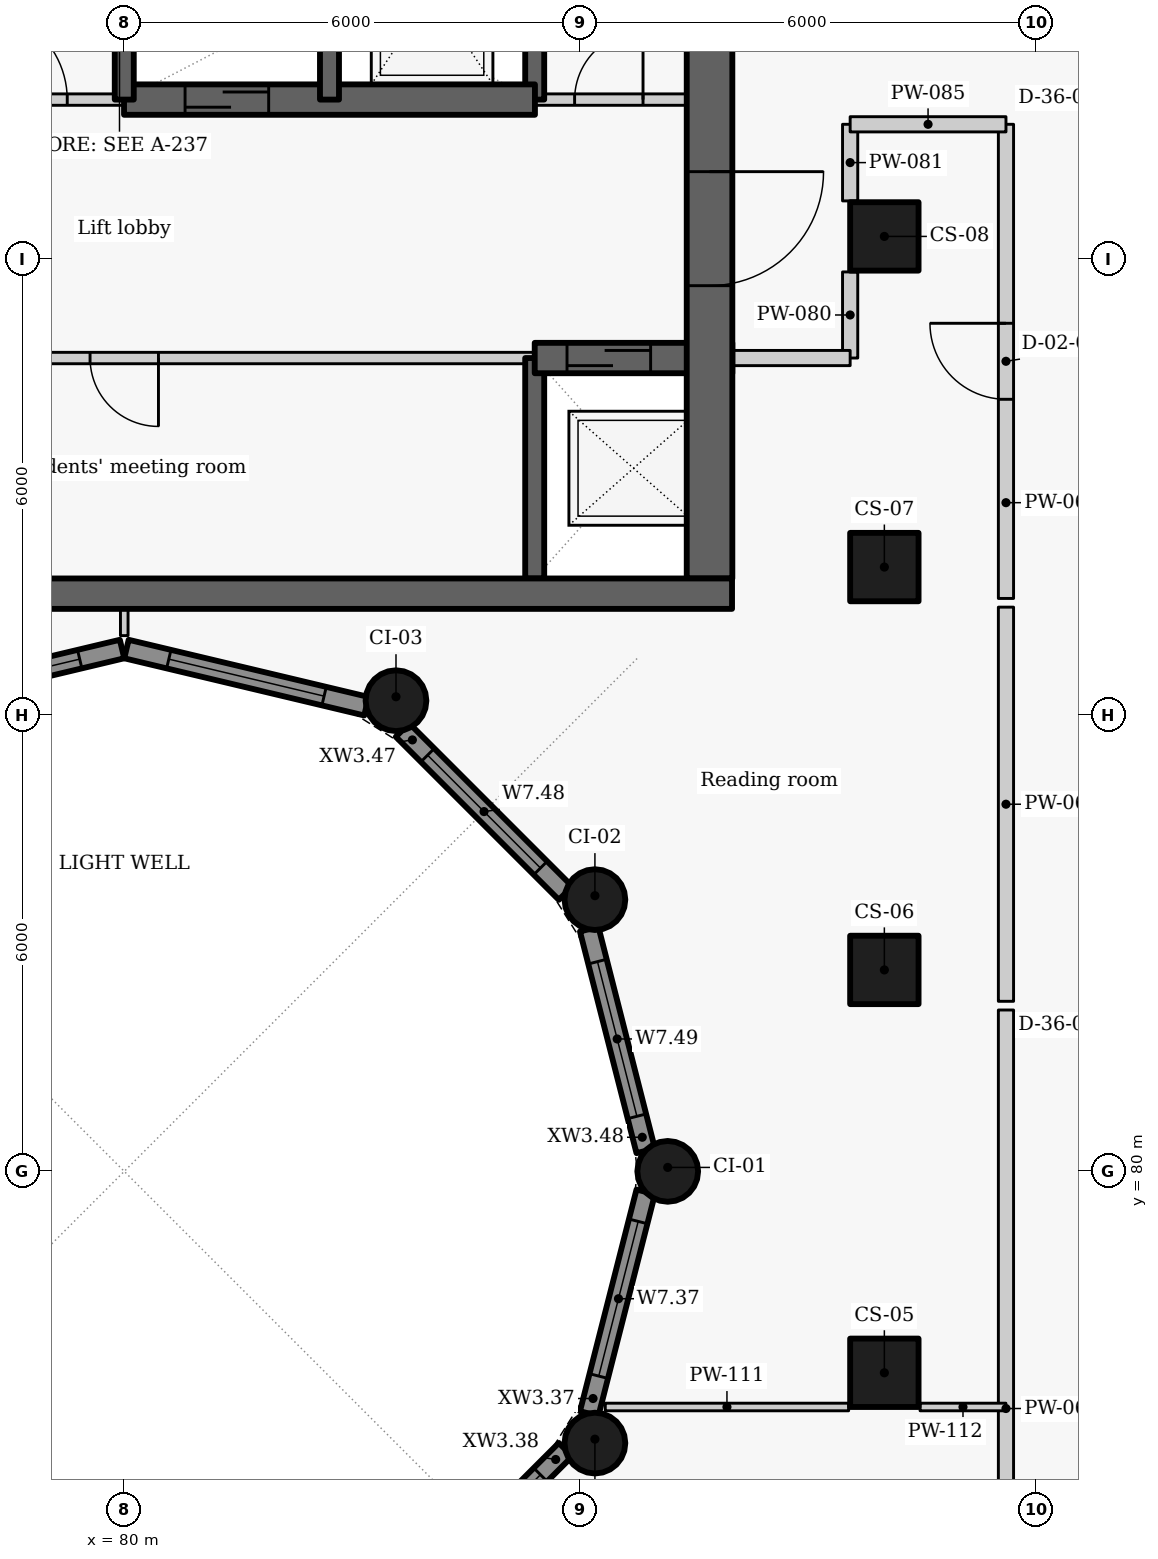
"""IFC4 building model, lengths in metres.
Left out: names, types, materials, properties, quantities, classifications, styles, units other than length and angle.
Written with IfcOpenShell. Run it as: python <this file> out.ifc"""

import sys

from ifc_helpers import new_model, si_unit, direction, frame, frame_2d, origin, origin_2d, place, context, subcontext, project, spatial, rectangle, circle, extrude, element, fill, save


model = new_model("IFC4")
c1 = context("Model", 3, precision=1e-05, world=origin(), true_north=direction((0.0, 1.0)))
c2 = subcontext(c1, "Body", "Model", "MODEL_VIEW")
j1 = project(units=[si_unit("LENGTHUNIT", "METRE"), si_unit("PLANEANGLEUNIT", "RADIAN")], contexts=[c1])
p1 = place(None, origin())
s1 = spatial("IfcSite", under=j1, at=p1, CompositionType="ELEMENT")
p2 = place(p1, origin())
s2 = spatial("IfcBuilding", under=s1, at=p2, CompositionType="ELEMENT")
p3 = place(p2, frame((0.0, 0.0, 216.3)))
s3 = spatial("IfcBuildingStorey", under=s2, at=p3, CompositionType="ELEMENT", Elevation=216.3)
for number, where, z_axis, x_axis in (
    (1, (90.0, 77.35, 0.0), (0.0, 0.0, 1.0), (0.0, 1.0, 0.0)),
    (2, (90.0, 82.65, 0.0), (0.0, 0.0, 1.0), (0.0, 1.0, 0.0)),
    (3, (90.0, 87.95, 0.0), (0.0, 0.0, 1.0), (0.0, 1.0, 0.0)),
    (4, (90.0, 92.3, 0.0), (0.0, 0.0, 1.0), (0.0, 1.0, 0.0)),
):
    element("IfcColumn", number, at=place(p3, frame(where, z_axis=z_axis, x_axis=x_axis)), inside=s3, PredefinedType="COLUMN", context=c2, shape_type="SweptSolid", body=[
        extrude(rectangle(XDim=0.9, YDim=0.9, at=origin_2d()), origin(), (0.0, 0.0, 1.0), 3.3),
    ])
for number, where, z_axis, x_axis in (
    (5, (87.15, 80.0, 0.0), (0.0, 0.0, 1.0), (0.0, 1.0, 0.0)),
    (6, (86.192, 83.575, 0.0), (0.0, 0.0, 1.0), (-0.5, 0.866, 0.0)),
    (7, (83.575, 86.192, 0.0), (0.0, 0.0, 1.0), (-0.866, 0.5, 0.0)),
    (8, (86.192, 76.425, 0.0), (0.0, 0.0, 1.0), (0.5, 0.866, 0.0)),
):
    element("IfcColumn", number, at=place(p3, frame(where, z_axis=z_axis, x_axis=x_axis)), inside=s3, PredefinedType="COLUMN", context=c2, shape_type="SweptSolid", body=[
        extrude(circle(Radius=0.4, at=origin_2d()), origin(), (0.0, 0.0, 1.0), 3.3),
    ])
p4 = place(p3, frame((86.86, 79.73, 0.0), z_axis=(0.0, 0.0, 1.0), x_axis=(-0.247055971283, -0.969001211069, 0.0)))
e9 = element("IfcWall", 9, at=p4, inside=s3, PredefinedType="SOLIDWALL", context=c2, shape_type="SweptSolid", body=[
    extrude(rectangle(XDim=3.01, YDim=0.25, at=frame_2d((1.505, 0.0))), origin(), (0.0, 0.0, 1.0), 2.05),
])
p5 = place(p4, frame((0.401, 0.0, 0.9)))
e10 = element("IfcOpeningElement", 10, at=p5, cuts=e9, PredefinedType="OPENING", context=c2, shape_type="SweptSolid", body=[
    extrude(rectangle(XDim=2.1, YDim=1.1, at=frame_2d((1.05, 0.55))), frame((0.0, 0.135, 0.0), z_axis=(0.0, -1.0, 0.0), x_axis=(1.0, 0.0, 0.0)), (0.0, 0.0, 1.0), 0.27),
])
p6 = place(p3, frame((85.806, 76.339, 0.0), z_axis=(0.0, 0.0, 1.0), x_axis=(-0.707106781187, -0.707106781187, 0.0)))
e11 = element("IfcWall", 11, at=p6, inside=s3, PredefinedType="SOLIDWALL", context=c2, shape_type="SweptSolid", body=[
    extrude(rectangle(XDim=3.033, YDim=0.25, at=frame_2d((1.517, 0.0))), origin(), (0.0, 0.0, 1.0), 2.05),
])
p7 = place(p6, frame((0.467, 0.0, 0.9)))
e12 = element("IfcOpeningElement", 12, at=p7, cuts=e11, PredefinedType="OPENING", context=c2, shape_type="SweptSolid", body=[
    extrude(rectangle(XDim=2.1, YDim=1.1, at=frame_2d((1.05, 0.55))), frame((0.0, 0.135, 0.0), z_axis=(0.0, -1.0, 0.0), x_axis=(1.0, 0.0, 0.0)), (0.0, 0.0, 1.0), 0.27),
])
p8 = place(p3, frame((76.814, 86.119, 0.0), z_axis=(0.0, 0.0, 1.0), x_axis=(0.972773113459, 0.231759508395, 0.0)))
e13 = element("IfcWall", 13, at=p8, inside=s3, PredefinedType="SOLIDWALL", context=c2, shape_type="SweptSolid", body=[
    extrude(rectangle(XDim=3.246, YDim=0.25, at=frame_2d((1.623, 0.0))), origin(), (0.0, 0.0, 1.0), 2.05),
])
p9 = place(p8, frame((0.573, 0.0, 0.9)))
e14 = element("IfcOpeningElement", 14, at=p9, cuts=e13, PredefinedType="OPENING", context=c2, shape_type="SweptSolid", body=[
    extrude(rectangle(XDim=2.1, YDim=1.1, at=frame_2d((1.05, 0.55))), frame((0.0, 0.135, 0.0), z_axis=(0.0, -1.0, 0.0), x_axis=(1.0, 0.0, 0.0)), (0.0, 0.0, 1.0), 0.27),
])
p10 = place(p3, frame((80.029, 86.872, 0.0), z_axis=(0.0, 0.0, 1.0), x_axis=(0.972773113459, -0.231759508395, 0.0)))
e15 = element("IfcWall", 15, at=p10, inside=s3, PredefinedType="SOLIDWALL", context=c2, shape_type="SweptSolid", body=[
    extrude(rectangle(XDim=3.246, YDim=0.25, at=frame_2d((1.623, 0.0))), origin(), (0.0, 0.0, 1.0), 2.05),
])
p11 = place(p10, frame((0.573, 0.0, 0.9)))
e16 = element("IfcOpeningElement", 16, at=p11, cuts=e15, PredefinedType="OPENING", context=c2, shape_type="SweptSolid", body=[
    extrude(rectangle(XDim=2.1, YDim=1.1, at=frame_2d((1.05, 0.55))), frame((0.0, 0.135, 0.0), z_axis=(0.0, -1.0, 0.0), x_axis=(1.0, 0.0, 0.0)), (0.0, 0.0, 1.0), 0.27),
])
p12 = place(p3, frame((83.661, 85.806, 0.0), z_axis=(0.0, 0.0, 1.0), x_axis=(0.707106781187, -0.707106781187, 0.0)))
e17 = element("IfcWall", 17, at=p12, inside=s3, PredefinedType="SOLIDWALL", context=c2, shape_type="SweptSolid", body=[
    extrude(rectangle(XDim=3.033, YDim=0.25, at=frame_2d((1.517, 0.0))), origin(), (0.0, 0.0, 1.0), 2.05),
])
p13 = place(p12, frame((0.467, 0.0, 0.9)))
e18 = element("IfcOpeningElement", 18, at=p13, cuts=e17, PredefinedType="OPENING", context=c2, shape_type="SweptSolid", body=[
    extrude(rectangle(XDim=2.1, YDim=1.1, at=frame_2d((1.05, 0.55))), frame((0.0, 0.135, 0.0), z_axis=(0.0, -1.0, 0.0), x_axis=(1.0, 0.0, 0.0)), (0.0, 0.0, 1.0), 0.27),
])
p14 = place(p3, frame((86.117, 83.187, 0.0), z_axis=(0.0, 0.0, 1.0), x_axis=(0.247055971283, -0.969001211069, 0.0)))
e19 = element("IfcWall", 19, at=p14, inside=s3, PredefinedType="SOLIDWALL", context=c2, shape_type="SweptSolid", body=[
    extrude(rectangle(XDim=3.01, YDim=0.25, at=frame_2d((1.505, 0.0))), origin(), (0.0, 0.0, 1.0), 2.05),
])
p15 = place(p14, frame((0.441, 0.0, 0.9)))
e20 = element("IfcOpeningElement", 20, at=p15, cuts=e19, PredefinedType="OPENING", context=c2, shape_type="SweptSolid", body=[
    extrude(rectangle(XDim=2.1, YDim=1.1, at=frame_2d((1.05, 0.55))), frame((0.0, 0.135, 0.0), z_axis=(0.0, -1.0, 0.0), x_axis=(1.0, 0.0, 0.0)), (0.0, 0.0, 1.0), 0.27),
])
p16 = place(p3, frame((85.4, 90.7, 0.0), z_axis=(0.0, 0.0, 1.0), x_axis=(-1.0, 0.0, 0.0)))
e21 = element("IfcWall", 21, at=p16, inside=s3, PredefinedType="PARTITIONING", context=c2, shape_type="SweptSolid", body=[
    extrude(rectangle(XDim=13.4, YDim=0.15, at=frame_2d((6.7, 0.0))), origin(), (0.0, 0.0, 1.0), 2.95),
])
p17 = place(p16, frame((11.325, 0.0, 0.0)))
e22 = element("IfcOpeningElement", 22, at=p17, cuts=e21, PredefinedType="OPENING", context=c2, shape_type="SweptSolid", body=[
    extrude(rectangle(XDim=0.9, YDim=2.1, at=frame_2d((0.45, 1.05))), frame((0.0, 0.085, 0.0), z_axis=(0.0, -1.0, 0.0), x_axis=(1.0, 0.0, 0.0)), (0.0, 0.0, 1.0), 0.17),
])
p18 = place(p16, frame((4.95, 0.0, 0.0)))
e23 = element("IfcOpeningElement", 23, at=p18, cuts=e21, PredefinedType="OPENING", context=c2, shape_type="SweptSolid", body=[
    extrude(rectangle(XDim=0.9, YDim=2.1, at=frame_2d((0.45, 1.05))), frame((0.0, 0.085, 0.0), z_axis=(0.0, -1.0, 0.0), x_axis=(1.0, 0.0, 0.0)), (0.0, 0.0, 1.0), 0.17),
])
p19 = place(p3, frame((85.4, 87.8, -0.275), z_axis=(0.0, 0.0, 1.0), x_axis=(0.0, 1.0, 0.0)))
e24 = element("IfcWall", 24, at=p19, inside=s3, PredefinedType="SHEAR", context=c2, shape_type="SweptSolid", body=[
    extrude(rectangle(XDim=2.9, YDim=0.25, at=frame_2d((1.45, 0.0))), origin(), (0.0, 0.0, 1.0), 3.225),
])
p20 = place(p3, frame((85.4, 94.1, -0.275), z_axis=(0.0, 0.0, 1.0), x_axis=(0.0, 1.0, 0.0)))
e25 = element("IfcWall", 25, at=p20, inside=s3, PredefinedType="SHEAR", context=c2, shape_type="SweptSolid", body=[
    extrude(rectangle(XDim=2.8, YDim=0.25, at=frame_2d((1.4, 0.0))), origin(), (0.0, 0.0, 1.0), 3.225),
])
p21 = place(p3, frame((85.4, 90.7, -0.275), z_axis=(0.0, 0.0, 1.0), x_axis=(1.0, 0.0, 0.0)))
e26 = element("IfcWall", 26, at=p21, inside=s3, PredefinedType="SHEAR", context=c2, shape_type="SweptSolid", body=[
    extrude(rectangle(XDim=2.6, YDim=0.4, at=frame_2d((1.3, 0.0))), origin(), (0.0, 0.0, 1.0), 3.225),
])
p22 = place(p21, frame((0.425, 0.0, 0.275)))
e27 = element("IfcOpeningElement", 27, at=p22, cuts=e26, PredefinedType="OPENING", context=c2, shape_type="SweptSolid", body=[
    extrude(rectangle(XDim=1.1, YDim=2.1, at=frame_2d((0.55, 1.05))), frame((0.0, 0.21, 0.0), z_axis=(0.0, -1.0, 0.0), x_axis=(1.0, 0.0, 0.0)), (0.0, 0.0, 1.0), 0.42),
])
p23 = place(p3, frame((87.7, 102.05, -0.275), z_axis=(0.0, 0.0, 1.0), x_axis=(0.0, -1.0, 0.0)))
e28 = element("IfcWall", 28, at=p23, inside=s3, PredefinedType="SHEAR", context=c2, shape_type="SweptSolid", body=[
    extrude(rectangle(XDim=14.25, YDim=0.6, at=frame_2d((7.125, 0.0))), origin(), (0.0, 0.0, 1.0), 3.225),
])
p24 = place(p23, frame((8.898, 0.0, 0.275)))
e29 = element("IfcOpeningElement", 29, at=p24, cuts=e28, PredefinedType="OPENING", context=c2, shape_type="SweptSolid", body=[
    extrude(rectangle(XDim=1.5, YDim=2.1, at=frame_2d((0.75, 1.05))), frame((0.0, 0.31, 0.0), z_axis=(0.0, -1.0, 0.0), x_axis=(1.0, 0.0, 0.0)), (0.0, 0.0, 1.0), 0.62),
])
p25 = place(p3, frame((77.297, 94.1, 0.0), z_axis=(0.0, 0.0, 1.0), x_axis=(1.0, 0.0, 0.0)))
e30 = element("IfcWall", 30, at=p25, inside=s3, PredefinedType="PARTITIONING", context=c2, shape_type="SweptSolid", body=[
    extrude(rectangle(XDim=2.706, YDim=0.15, at=frame_2d((1.353, 0.0))), origin(), (0.0, 0.0, 1.0), 2.95),
])
p26 = place(p25, frame((0.753, 0.0, 0.0)))
e31 = element("IfcOpeningElement", 31, at=p26, cuts=e30, PredefinedType="OPENING", context=c2, shape_type="SweptSolid", body=[
    extrude(rectangle(XDim=1.2, YDim=2.1, at=frame_2d((0.6, 1.05))), frame((0.0, 0.085, 0.0), z_axis=(0.0, -1.0, 0.0), x_axis=(1.0, 0.0, 0.0)), (0.0, 0.0, 1.0), 0.17),
])
p27 = place(p3, frame((85.397, 94.1, 0.0), z_axis=(0.0, 0.0, 1.0), x_axis=(1.0, 0.0, 0.0)))
e32 = element("IfcWall", 32, at=p27, inside=s3, PredefinedType="PARTITIONING", context=c2, shape_type="SweptSolid", body=[
    extrude(rectangle(XDim=2.603, YDim=0.15, at=frame_2d((1.302, 0.0))), origin(), (0.0, 0.0, 1.0), 2.95),
])
p28 = place(p27, frame((0.528, 0.0, 0.0)))
e33 = element("IfcOpeningElement", 33, at=p28, cuts=e32, PredefinedType="OPENING", context=c2, shape_type="SweptSolid", body=[
    extrude(rectangle(XDim=0.9, YDim=2.1, at=frame_2d((0.45, 1.05))), frame((0.0, 0.085, 0.0), z_axis=(0.0, -1.0, 0.0), x_axis=(1.0, 0.0, 0.0)), (0.0, 0.0, 1.0), 0.17),
])
p29 = place(p3, frame((79.997, 94.1, -0.275), z_axis=(0.0, 0.0, 1.0), x_axis=(1.0, 0.0, 0.0)))
e34 = element("IfcWall", 34, at=p29, inside=s3, PredefinedType="SHEAR", context=c2, shape_type="SweptSolid", body=[
    extrude(rectangle(XDim=5.406, YDim=0.4, at=frame_2d((2.703, 0.0))), origin(), (0.0, 0.0, 1.0), 3.225),
])
p30 = place(p29, frame((0.803, 0.0, 0.275)))
e35 = element("IfcOpeningElement", 35, at=p30, cuts=e34, PredefinedType="OPENING", context=c2, shape_type="SweptSolid", body=[
    extrude(rectangle(XDim=1.1, YDim=2.1, at=frame_2d((0.55, 1.05))), frame((0.0, 0.21, 0.0), z_axis=(0.0, -1.0, 0.0), x_axis=(1.0, 0.0, 0.0)), (0.0, 0.0, 1.0), 0.42),
])
for number, where, z_axis, x_axis in (
    (36, (80.0, 94.1, -0.275), (0.0, 0.0, 1.0), (0.0, 1.0, 0.0)),
    (37, (82.7, 94.1, -0.275), (0.0, 0.0, 1.0), (0.0, 1.0, 0.0)),
):
    element("IfcWall", number, at=place(p3, frame(where, z_axis=z_axis, x_axis=x_axis)), inside=s3, PredefinedType="SHEAR", context=c2, shape_type="SweptSolid", body=[
        extrude(rectangle(XDim=2.8, YDim=0.25, at=frame_2d((1.4, 0.0))), origin(), (0.0, 0.0, 1.0), 3.225),
    ])
p31 = place(p3, frame((91.6, 71.637, 0.0), z_axis=(0.0, 0.0, 1.0), x_axis=(0.0, 1.0, 0.0)))
e38 = element("IfcWall", 38, at=p31, inside=s3, PredefinedType="PARTITIONING", context=c2, shape_type="SweptSolid", body=[
    extrude(rectangle(XDim=10.486, YDim=0.2, at=frame_2d((5.243, 0.0))), origin(), (0.0, 0.0, 1.0), 2.95),
])
p32 = place(p3, frame((91.6, 82.237, 0.0), z_axis=(0.0, 0.0, 1.0), x_axis=(0.0, 1.0, 0.0)))
e39 = element("IfcWall", 39, at=p32, inside=s3, PredefinedType="PARTITIONING", context=c2, shape_type="SweptSolid", body=[
    extrude(rectangle(XDim=5.186, YDim=0.2, at=frame_2d((2.593, 0.0))), origin(), (0.0, 0.0, 1.0), 2.95),
])
p33 = place(p3, frame((91.6, 87.537, 0.0), z_axis=(0.0, 0.0, 1.0), x_axis=(0.0, 1.0, 0.0)))
e40 = element("IfcWall", 40, at=p33, inside=s3, PredefinedType="PARTITIONING", context=c2, shape_type="SweptSolid", body=[
    extrude(rectangle(XDim=6.238, YDim=0.2, at=frame_2d((3.119, 0.0))), origin(), (0.0, 0.0, 1.0), 2.95),
])
p34 = place(p33, frame((2.62, 0.0, 0.0)))
e41 = element("IfcOpeningElement", 41, at=p34, cuts=e40, PredefinedType="OPENING", context=c2, shape_type="SweptSolid", body=[
    extrude(rectangle(XDim=1.0, YDim=2.1, at=frame_2d((0.5, 1.05))), frame((0.0, 0.11, 0.0), z_axis=(0.0, -1.0, 0.0), x_axis=(1.0, 0.0, 0.0)), (0.0, 0.0, 1.0), 0.22),
])
p35 = place(p3, frame((89.55, 90.7, 0.0), z_axis=(0.0, 0.0, 1.0), x_axis=(0.0, 1.0, 0.0)))
e42 = element("IfcWall", 42, at=p35, inside=s3, PredefinedType="PARTITIONING", context=c2, shape_type="SweptSolid", body=[
    extrude(rectangle(XDim=1.133, YDim=0.2, at=frame_2d((0.566, 0.0))), origin(), (0.0, 0.0, 1.0), 2.43),
])
p36 = place(p3, frame((89.55, 92.767, 0.0), z_axis=(0.0, 0.0, 1.0), x_axis=(0.0, 1.0, 0.0)))
e43 = element("IfcWall", 43, at=p36, inside=s3, PredefinedType="PARTITIONING", context=c2, shape_type="SweptSolid", body=[
    extrude(rectangle(XDim=1.008, YDim=0.2, at=frame_2d((0.504, 0.0))), origin(), (0.0, 0.0, 1.0), 2.43),
])
p37 = place(p3, frame((89.55, 93.775, 0.0), z_axis=(0.0, 0.0, 1.0), x_axis=(1.0, 0.0, 0.0)))
e44 = element("IfcWall", 44, at=p37, inside=s3, PredefinedType="PARTITIONING", context=c2, shape_type="SweptSolid", body=[
    extrude(rectangle(XDim=2.05, YDim=0.2, at=frame_2d((1.025, 0.0))), origin(), (0.0, 0.0, 1.0), 2.43),
])
p38 = place(p3, frame((88.0, 90.7, 0.0), z_axis=(0.0, 0.0, 1.0), x_axis=(1.0, 0.0, 0.0)))
e45 = element("IfcWall", 45, at=p38, inside=s3, PredefinedType="PARTITIONING", context=c2, shape_type="SweptSolid", body=[
    extrude(rectangle(XDim=1.55, YDim=0.2, at=frame_2d((0.775, 0.0))), origin(), (0.0, 0.0, 1.0), 2.95),
])
p39 = place(p3, frame((80.0, 87.048, 0.0), z_axis=(0.0, 0.0, 1.0), x_axis=(0.0, 1.0, 0.0)))
e46 = element("IfcWall", 46, at=p39, inside=s3, PredefinedType="PARTITIONING", context=c2, shape_type="SweptSolid", body=[
    extrude(rectangle(XDim=0.352, YDim=0.1, at=frame_2d((0.176, 0.0))), origin(), (0.0, 0.0, 1.0), 2.95),
])
p40 = place(p3, frame((86.328, 76.9, 0.0), z_axis=(0.0, 0.0, 1.0), x_axis=(1.0, 0.0, 0.0)))
e47 = element("IfcWall", 47, at=p40, inside=s3, PredefinedType="PARTITIONING", context=c2, shape_type="SweptSolid", body=[
    extrude(rectangle(XDim=3.202, YDim=0.1, at=frame_2d((1.601, 0.0))), origin(), (0.0, 0.0, 1.0), 2.95),
])
p41 = place(p3, frame((90.47, 76.9, 0.0), z_axis=(0.0, 0.0, 1.0), x_axis=(1.0, 0.0, 0.0)))
e48 = element("IfcWall", 48, at=p41, inside=s3, PredefinedType="PARTITIONING", context=c2, shape_type="SweptSolid", body=[
    extrude(rectangle(XDim=1.129, YDim=0.1, at=frame_2d((0.564, 0.0))), origin(), (0.0, 0.0, 1.0), 2.95),
])
p42 = place(p3, frame((72.004, 87.6, -0.275), z_axis=(0.0, 0.0, 1.0), x_axis=(1.0, 0.0, 0.0)))
e49 = element("IfcWall", 49, at=p42, inside=s3, PredefinedType="SHEAR", context=c2, shape_type="SweptSolid", body=[
    extrude(rectangle(XDim=15.992, YDim=0.4, at=frame_2d((7.996, 0.0))), origin(), (0.0, 0.0, 1.0), 3.225),
])
p43 = place(p5, origin())
e50 = element("IfcWindow", 50, at=p43, inside=s3, PartitioningType="SINGLE_PANEL", PredefinedType="WINDOW", context=c2, shape_type="SweptSolid", body=[
    extrude(rectangle(XDim=2.1, YDim=1.1, at=frame_2d((1.05, 0.55))), frame((0.0, 0.03, 0.0), z_axis=(0.0, -1.0, 0.0), x_axis=(1.0, 0.0, 0.0)), (0.0, 0.0, 1.0), 0.06),
])
fill(e10, e50)
p44 = place(p7, origin())
e51 = element("IfcWindow", 51, at=p44, inside=s3, PartitioningType="SINGLE_PANEL", PredefinedType="WINDOW", context=c2, shape_type="SweptSolid", body=[
    extrude(rectangle(XDim=2.1, YDim=1.1, at=frame_2d((1.05, 0.55))), frame((0.0, 0.03, 0.0), z_axis=(0.0, -1.0, 0.0), x_axis=(1.0, 0.0, 0.0)), (0.0, 0.0, 1.0), 0.06),
])
fill(e12, e51)
p45 = place(p9, origin())
e52 = element("IfcWindow", 52, at=p45, inside=s3, PartitioningType="SINGLE_PANEL", PredefinedType="WINDOW", context=c2, shape_type="SweptSolid", body=[
    extrude(rectangle(XDim=2.1, YDim=1.1, at=frame_2d((1.05, 0.55))), frame((0.0, 0.03, 0.0), z_axis=(0.0, -1.0, 0.0), x_axis=(1.0, 0.0, 0.0)), (0.0, 0.0, 1.0), 0.06),
])
fill(e14, e52)
p46 = place(p11, origin())
e53 = element("IfcWindow", 53, at=p46, inside=s3, PartitioningType="SINGLE_PANEL", PredefinedType="WINDOW", context=c2, shape_type="SweptSolid", body=[
    extrude(rectangle(XDim=2.1, YDim=1.1, at=frame_2d((1.05, 0.55))), frame((0.0, 0.03, 0.0), z_axis=(0.0, -1.0, 0.0), x_axis=(1.0, 0.0, 0.0)), (0.0, 0.0, 1.0), 0.06),
])
fill(e16, e53)
p47 = place(p13, origin())
e54 = element("IfcWindow", 54, at=p47, inside=s3, PartitioningType="SINGLE_PANEL", PredefinedType="WINDOW", context=c2, shape_type="SweptSolid", body=[
    extrude(rectangle(XDim=2.1, YDim=1.1, at=frame_2d((1.05, 0.55))), frame((0.0, 0.03, 0.0), z_axis=(0.0, -1.0, 0.0), x_axis=(1.0, 0.0, 0.0)), (0.0, 0.0, 1.0), 0.06),
])
fill(e18, e54)
p48 = place(p15, origin())
e55 = element("IfcWindow", 55, at=p48, inside=s3, PartitioningType="SINGLE_PANEL", PredefinedType="WINDOW", context=c2, shape_type="SweptSolid", body=[
    extrude(rectangle(XDim=2.1, YDim=1.1, at=frame_2d((1.05, 0.55))), frame((0.0, 0.03, 0.0), z_axis=(0.0, -1.0, 0.0), x_axis=(1.0, 0.0, 0.0)), (0.0, 0.0, 1.0), 0.06),
])
fill(e20, e55)
p49 = place(p22, origin())
e56 = element("IfcDoor", 56, at=p49, inside=s3, OperationType="SLIDING_TO_LEFT", PredefinedType="DOOR", context=c2, shape_type="SweptSolid", body=[
    extrude(rectangle(XDim=1.1, YDim=2.1, at=frame_2d((0.55, 1.05))), frame((0.0, 0.025, 0.0), z_axis=(0.0, -1.0, 0.0), x_axis=(1.0, 0.0, 0.0)), (0.0, 0.0, 1.0), 0.05),
])
fill(e27, e56)
p50 = place(p18, origin())
e57 = element("IfcDoor", 57, at=p50, inside=s3, OperationType="SINGLE_SWING_LEFT", PredefinedType="DOOR", context=c2, shape_type="SweptSolid", body=[
    extrude(rectangle(XDim=0.9, YDim=2.1, at=frame_2d((0.45, 1.05))), frame((0.0, 0.025, 0.0), z_axis=(0.0, -1.0, 0.0), x_axis=(1.0, 0.0, 0.0)), (0.0, 0.0, 1.0), 0.05),
])
fill(e23, e57)
p51 = place(p26, origin())
e58 = element("IfcDoor", 58, at=p51, inside=s3, OperationType="DOUBLE_DOOR_SINGLE_SWING", PredefinedType="DOOR", context=c2, shape_type="SweptSolid", body=[
    extrude(rectangle(XDim=1.2, YDim=2.1, at=frame_2d((0.6, 1.05))), frame((0.0, 0.025, 0.0), z_axis=(0.0, -1.0, 0.0), x_axis=(1.0, 0.0, 0.0)), (0.0, 0.0, 1.0), 0.05),
])
fill(e31, e58)
p52 = place(p30, origin())
e59 = element("IfcDoor", 59, at=p52, inside=s3, OperationType="SLIDING_TO_LEFT", PredefinedType="DOOR", context=c2, shape_type="SweptSolid", body=[
    extrude(rectangle(XDim=1.1, YDim=2.1, at=frame_2d((0.55, 1.05))), frame((0.0, 0.025, 0.0), z_axis=(0.0, -1.0, 0.0), x_axis=(1.0, 0.0, 0.0)), (0.0, 0.0, 1.0), 0.05),
])
fill(e35, e59)
p53 = place(p28, origin())
e60 = element("IfcDoor", 60, at=p53, inside=s3, OperationType="SINGLE_SWING_RIGHT", PredefinedType="DOOR", context=c2, shape_type="SweptSolid", body=[
    extrude(rectangle(XDim=0.9, YDim=2.1, at=frame_2d((0.45, 1.05))), frame((0.0, 0.025, 0.0), z_axis=(0.0, -1.0, 0.0), x_axis=(1.0, 0.0, 0.0)), (0.0, 0.0, 1.0), 0.05),
])
fill(e33, e60)
p54 = place(p34, origin())
e61 = element("IfcDoor", 61, at=p54, inside=s3, OperationType="SINGLE_SWING_RIGHT", PredefinedType="DOOR", context=c2, shape_type="SweptSolid", body=[
    extrude(rectangle(XDim=1.0, YDim=2.1, at=frame_2d((0.5, 1.05))), frame((0.0, 0.025, 0.0), z_axis=(0.0, -1.0, 0.0), x_axis=(1.0, 0.0, 0.0)), (0.0, 0.0, 1.0), 0.05),
])
fill(e41, e61)
p55 = place(p24, origin())
e62 = element("IfcDoor", 62, at=p55, inside=s3, OperationType="DOUBLE_DOOR_SINGLE_SWING", PredefinedType="DOOR", context=c2, shape_type="SweptSolid", body=[
    extrude(rectangle(XDim=1.5, YDim=2.1, at=frame_2d((0.75, 1.05))), frame((0.0, 0.025, 0.0), z_axis=(0.0, -1.0, 0.0), x_axis=(1.0, 0.0, 0.0)), (0.0, 0.0, 1.0), 0.05),
])
fill(e29, e62)
save(model, sys.argv[1])
